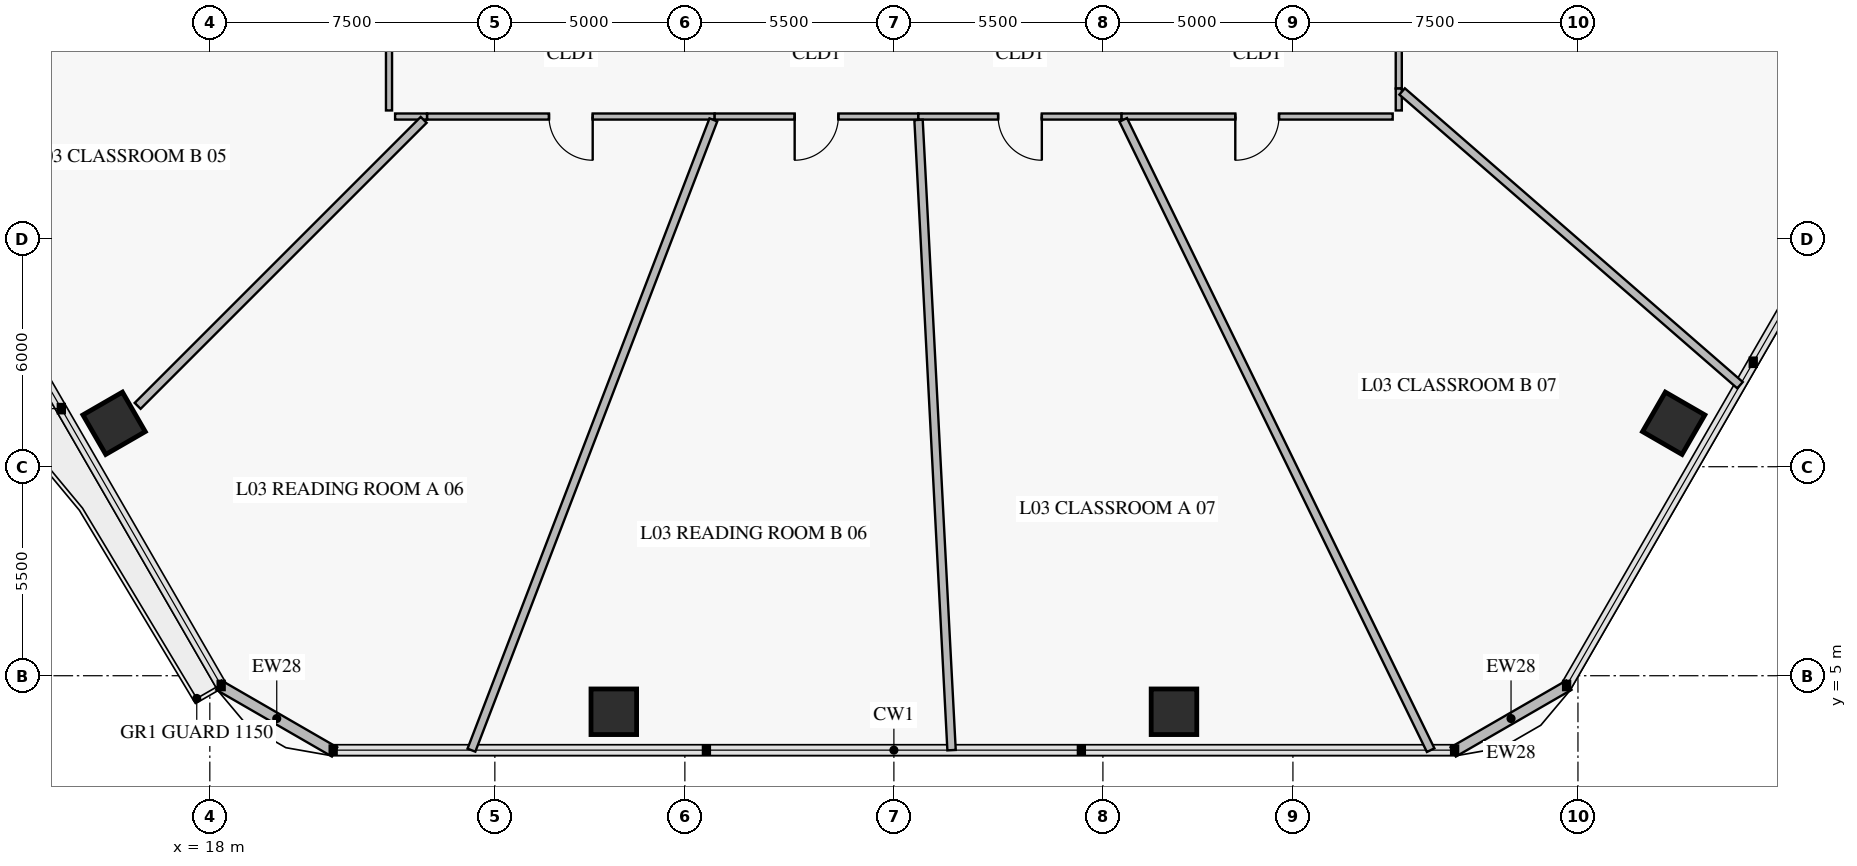
"""IFC4 building model, lengths in metres.
Left out: names, types, materials, properties, quantities, classifications, styles, units other than length and angle.
Written with IfcOpenShell. Run it as: python <this file> out.ifc"""

import sys

from ifc_helpers import new_model, si_unit, direction, frame, frame_2d, origin, origin_2d, place, context, subcontext, project, spatial, rectangle, extrude, element, fill, save


model = new_model("IFC4")
c1 = context("Model", 3, precision=1e-05, world=origin(), true_north=direction((0.0, 1.0)))
c2 = subcontext(c1, "Body", "Model", "MODEL_VIEW")
j1 = project(units=[si_unit("LENGTHUNIT", "METRE"), si_unit("PLANEANGLEUNIT", "RADIAN")], contexts=[c1])
p1 = place(None, origin())
s1 = spatial("IfcSite", under=j1, at=p1, CompositionType="ELEMENT")
p2 = place(p1, origin())
s2 = spatial("IfcBuilding", under=s1, at=p2, CompositionType="ELEMENT")
p3 = place(p2, frame((0.0, 0.0, 12.0)))
s3 = spatial("IfcBuildingStorey", under=s2, at=p3, CompositionType="ELEMENT", Elevation=12.0)
for number, where, z_axis, x_axis in (
    (1, (15.481, 11.643, 0.0), (0.0, 0.0, 1.0), (0.5, -0.866, 0.0)),
    (2, (28.63, 4.052, 0.0), (0.0, 0.0, 1.0), (1.0, 0.0, 0.0)),
    (3, (43.37, 4.052, 0.0), (0.0, 0.0, 1.0), (1.0, 0.0, 0.0)),
    (4, (56.519, 11.643, 0.0), (0.0, 0.0, 1.0), (0.5, 0.866, 0.0)),
):
    element("IfcColumn", number, at=place(p3, frame(where, z_axis=z_axis, x_axis=x_axis)), inside=s3, PredefinedType="COLUMN", context=c2, shape_type="SweptSolid", body=[
        extrude(rectangle(XDim=1.2, YDim=1.2, at=origin_2d()), origin(), (0.0, 0.0, 1.0), 3.92),
    ])
for number, where, z_axis, x_axis in (
    (5, (53.761, 4.751, 0.0), (0.0, 0.0, 1.0), (-0.866, -0.5, 0.0)),
    (6, (21.283, 2.994, 0.0), (0.0, 0.0, 1.0), (-0.866, 0.5, 0.0)),
):
    element("IfcWall", number, at=place(p3, frame(where, z_axis=z_axis, x_axis=x_axis)), inside=s3, PredefinedType="SOLIDWALL", context=c2, shape_type="SweptSolid", body=[
        extrude(rectangle(XDim=3.515, YDim=0.28, at=frame_2d((1.757, 0.0))), origin(), (0.0, 0.0, 1.0), 3.92),
    ])
p4 = place(p3, frame((22.715, 26.633, 0.0), z_axis=(0.0, 0.0, 1.0), x_axis=(0.0, -1.0, 0.0)))
e7 = element("IfcWall", 7, at=p4, inside=s3, PredefinedType="PARTITIONING", context=c2, shape_type="SweptSolid", body=[
    extrude(rectangle(XDim=6.758, YDim=0.16, at=frame_2d((3.379, 0.0))), origin(), (0.0, 0.0, 1.0), 3.92),
])
p5 = place(p4, frame((2.804, 0.0, 0.0)))
e8 = element("IfcOpeningElement", 8, at=p5, cuts=e7, PredefinedType="OPENING", context=c2, shape_type="SweptSolid", body=[
    extrude(rectangle(XDim=1.15, YDim=2.2, at=frame_2d((0.575, 1.1))), frame((0.0, 0.092, 0.0), z_axis=(0.0, -1.0, 0.0), x_axis=(1.0, 0.0, 0.0)), (0.0, 0.0, 1.0), 0.184),
])
p6 = place(p3, frame((23.715, 19.715, 0.0), z_axis=(0.0, 0.0, 1.0), x_axis=(1.0, 0.0, 0.0)))
e9 = element("IfcWall", 9, at=p6, inside=s3, PredefinedType="PARTITIONING", context=c2, shape_type="SweptSolid", body=[
    extrude(rectangle(XDim=7.569, YDim=0.16, at=frame_2d((3.785, 0.0))), origin(), (0.0, 0.0, 1.0), 3.22),
])
p7 = place(p6, frame((3.21, 0.0, 0.0)))
e10 = element("IfcOpeningElement", 10, at=p7, cuts=e9, PredefinedType="OPENING", context=c2, shape_type="SweptSolid", body=[
    extrude(rectangle(XDim=1.15, YDim=2.2, at=frame_2d((0.575, 1.1))), frame((0.0, 0.092, 0.0), z_axis=(0.0, -1.0, 0.0), x_axis=(1.0, 0.0, 0.0)), (0.0, 0.0, 1.0), 0.184),
])
p8 = place(p3, frame((31.284, 19.715, 0.0), z_axis=(0.0, 0.0, 1.0), x_axis=(1.0, 0.0, 0.0)))
e11 = element("IfcWall", 11, at=p8, inside=s3, PredefinedType="PARTITIONING", context=c2, shape_type="SweptSolid", body=[
    extrude(rectangle(XDim=5.36, YDim=0.16, at=frame_2d((2.68, 0.0))), origin(), (0.0, 0.0, 1.0), 3.22),
])
p9 = place(p8, frame((2.105, 0.0, 0.0)))
e12 = element("IfcOpeningElement", 12, at=p9, cuts=e11, PredefinedType="OPENING", context=c2, shape_type="SweptSolid", body=[
    extrude(rectangle(XDim=1.15, YDim=2.2, at=frame_2d((0.575, 1.1))), frame((0.0, 0.092, 0.0), z_axis=(0.0, -1.0, 0.0), x_axis=(1.0, 0.0, 0.0)), (0.0, 0.0, 1.0), 0.184),
])
p10 = place(p3, frame((36.644, 19.715, 0.0), z_axis=(0.0, 0.0, 1.0), x_axis=(1.0, 0.0, 0.0)))
e13 = element("IfcWall", 13, at=p10, inside=s3, PredefinedType="PARTITIONING", context=c2, shape_type="SweptSolid", body=[
    extrude(rectangle(XDim=5.348, YDim=0.16, at=frame_2d((2.674, 0.0))), origin(), (0.0, 0.0, 1.0), 3.22),
])
p11 = place(p10, frame((2.099, 0.0, 0.0)))
e14 = element("IfcOpeningElement", 14, at=p11, cuts=e13, PredefinedType="OPENING", context=c2, shape_type="SweptSolid", body=[
    extrude(rectangle(XDim=1.15, YDim=2.2, at=frame_2d((0.575, 1.1))), frame((0.0, 0.092, 0.0), z_axis=(0.0, -1.0, 0.0), x_axis=(1.0, 0.0, 0.0)), (0.0, 0.0, 1.0), 0.184),
])
p12 = place(p3, frame((41.992, 19.715, 0.0), z_axis=(0.0, 0.0, 1.0), x_axis=(1.0, 0.0, 0.0)))
e15 = element("IfcWall", 15, at=p12, inside=s3, PredefinedType="PARTITIONING", context=c2, shape_type="SweptSolid", body=[
    extrude(rectangle(XDim=7.133, YDim=0.16, at=frame_2d((3.567, 0.0))), origin(), (0.0, 0.0, 1.0), 3.22),
])
p13 = place(p12, frame((2.992, 0.0, 0.0)))
e16 = element("IfcOpeningElement", 16, at=p13, cuts=e15, PredefinedType="OPENING", context=c2, shape_type="SweptSolid", body=[
    extrude(rectangle(XDim=1.15, YDim=2.2, at=frame_2d((0.575, 1.1))), frame((0.0, 0.092, 0.0), z_axis=(0.0, -1.0, 0.0), x_axis=(1.0, 0.0, 0.0)), (0.0, 0.0, 1.0), 0.184),
])
p14 = place(p3, frame((49.285, 20.451, 0.0), z_axis=(0.0, 0.0, 1.0), x_axis=(0.0, 1.0, 0.0)))
e17 = element("IfcWall", 17, at=p14, inside=s3, PredefinedType="PARTITIONING", context=c2, shape_type="SweptSolid", body=[
    extrude(rectangle(XDim=12.711, YDim=0.16, at=frame_2d((6.355, 0.0))), origin(), (0.0, 0.0, 1.0), 3.22),
])
p15 = place(p14, frame((5.88, 0.0, 0.0)))
e18 = element("IfcOpeningElement", 18, at=p15, cuts=e17, PredefinedType="OPENING", context=c2, shape_type="SweptSolid", body=[
    extrude(rectangle(XDim=0.95, YDim=2.1, at=frame_2d((0.475, 1.05))), frame((0.0, 0.092, 0.0), z_axis=(0.0, -1.0, 0.0), x_axis=(1.0, 0.0, 0.0)), (0.0, 0.0, 1.0), 0.184),
])
p16 = place(p3, frame((22.627, 26.597, 0.0), z_axis=(0.0, 0.0, 1.0), x_axis=(-0.927186166431, -0.3746008713, 0.0)))
e19 = element("IfcWall", 19, at=p16, inside=s3, PredefinedType="PARTITIONING", context=c2, shape_type="SweptSolid", body=[
    extrude(rectangle(XDim=14.82, YDim=0.22, at=frame_2d((7.41, 0.0))), origin(), (0.0, 0.0, 1.0), 3.17),
])
p17 = place(p3, frame((22.875, 19.715, 0.0), z_axis=(0.0, 0.0, 1.0), x_axis=(1.0, 0.0, 0.0)))
e20 = element("IfcWall", 20, at=p17, inside=s3, PredefinedType="PARTITIONING", context=c2, shape_type="SweptSolid", body=[
    extrude(rectangle(XDim=0.84, YDim=0.16, at=frame_2d((0.42, 0.0))), origin(), (0.0, 0.0, 1.0), 3.22),
])
p18 = place(p3, frame((23.627, 19.627, 0.0), z_axis=(0.0, 0.0, 1.0), x_axis=(-0.707106781187, -0.707106781187, 0.0)))
e21 = element("IfcWall", 21, at=p18, inside=s3, PredefinedType="PARTITIONING", context=c2, shape_type="SweptSolid", body=[
    extrude(rectangle(XDim=10.643, YDim=0.22, at=frame_2d((5.322, 0.0))), origin(), (0.0, 0.0, 1.0), 3.22),
])
p19 = place(p3, frame((31.25, 19.627, 0.0), z_axis=(0.0, 0.0, 1.0), x_axis=(-0.358374904207, -0.933577756823, 0.0)))
e22 = element("IfcWall", 22, at=p19, inside=s3, PredefinedType="PARTITIONING", context=c2, shape_type="SweptSolid", body=[
    extrude(rectangle(XDim=17.765, YDim=0.22, at=frame_2d((8.883, 0.0))), origin(), (0.0, 0.0, 1.0), 3.17),
])
p20 = place(p3, frame((36.648, 19.627, 0.0), z_axis=(0.0, 0.0, 1.0), x_axis=(0.052331996973, -0.998629742243, 0.0)))
e23 = element("IfcWall", 23, at=p20, inside=s3, PredefinedType="PARTITIONING", context=c2, shape_type="SweptSolid", body=[
    extrude(rectangle(XDim=16.608, YDim=0.22, at=frame_2d((8.304, 0.0))), origin(), (0.0, 0.0, 1.0), 3.17),
])
p21 = place(p3, frame((42.035, 19.627, 0.0), z_axis=(0.0, 0.0, 1.0), x_axis=(0.438375147569, -0.898792094977, 0.0)))
e24 = element("IfcWall", 24, at=p21, inside=s3, PredefinedType="PARTITIONING", context=c2, shape_type="SweptSolid", body=[
    extrude(rectangle(XDim=18.453, YDim=0.22, at=frame_2d((9.227, 0.0))), origin(), (0.0, 0.0, 1.0), 3.17),
])
p22 = place(p3, frame((49.285, 19.875, 0.0), z_axis=(0.0, 0.0, 1.0), x_axis=(0.0, 1.0, 0.0)))
e25 = element("IfcWall", 25, at=p22, inside=s3, PredefinedType="PARTITIONING", context=c2, shape_type="SweptSolid", body=[
    extrude(rectangle(XDim=0.576, YDim=0.16, at=frame_2d((0.288, 0.0))), origin(), (0.0, 0.0, 1.0), 3.92),
])
p23 = place(p3, frame((49.373, 20.375, 0.0), z_axis=(0.0, 0.0, 1.0), x_axis=(0.754715261602, -0.656052493254, 0.0)))
e26 = element("IfcWall", 26, at=p23, inside=s3, PredefinedType="PARTITIONING", context=c2, shape_type="SweptSolid", body=[
    extrude(rectangle(XDim=11.781, YDim=0.22, at=frame_2d((5.891, 0.0))), origin(), (0.0, 0.0, 1.0), 3.17),
])
p24 = place(p7, frame((1.15, 0.0, 0.0), z_axis=(0.0, 0.0, 1.0), x_axis=(-1.0, 0.0, 0.0)))
e27 = element("IfcDoor", 27, at=p24, inside=s3, OperationType="SINGLE_SWING_LEFT", PredefinedType="DOOR", context=c2, shape_type="SweptSolid", body=[
    extrude(rectangle(XDim=1.15, YDim=2.2, at=frame_2d((0.575, 1.1))), frame((0.0, 0.025, 0.0), z_axis=(0.0, -1.0, 0.0), x_axis=(1.0, 0.0, 0.0)), (0.0, 0.0, 1.0), 0.05),
])
fill(e10, e27)
p25 = place(p9, frame((1.15, 0.0, 0.0), z_axis=(0.0, 0.0, 1.0), x_axis=(-1.0, 0.0, 0.0)))
e28 = element("IfcDoor", 28, at=p25, inside=s3, OperationType="SINGLE_SWING_RIGHT", PredefinedType="DOOR", context=c2, shape_type="SweptSolid", body=[
    extrude(rectangle(XDim=1.15, YDim=2.2, at=frame_2d((0.575, 1.1))), frame((0.0, 0.025, 0.0), z_axis=(0.0, -1.0, 0.0), x_axis=(1.0, 0.0, 0.0)), (0.0, 0.0, 1.0), 0.05),
])
fill(e12, e28)
p26 = place(p11, frame((1.15, 0.0, 0.0), z_axis=(0.0, 0.0, 1.0), x_axis=(-1.0, 0.0, 0.0)))
e29 = element("IfcDoor", 29, at=p26, inside=s3, OperationType="SINGLE_SWING_LEFT", PredefinedType="DOOR", context=c2, shape_type="SweptSolid", body=[
    extrude(rectangle(XDim=1.15, YDim=2.2, at=frame_2d((0.575, 1.1))), frame((0.0, 0.025, 0.0), z_axis=(0.0, -1.0, 0.0), x_axis=(1.0, 0.0, 0.0)), (0.0, 0.0, 1.0), 0.05),
])
fill(e14, e29)
p27 = place(p13, frame((1.15, 0.0, 0.0), z_axis=(0.0, 0.0, 1.0), x_axis=(-1.0, 0.0, 0.0)))
e30 = element("IfcDoor", 30, at=p27, inside=s3, OperationType="SINGLE_SWING_RIGHT", PredefinedType="DOOR", context=c2, shape_type="SweptSolid", body=[
    extrude(rectangle(XDim=1.15, YDim=2.2, at=frame_2d((0.575, 1.1))), frame((0.0, 0.025, 0.0), z_axis=(0.0, -1.0, 0.0), x_axis=(1.0, 0.0, 0.0)), (0.0, 0.0, 1.0), 0.05),
])
fill(e16, e30)
save(model, sys.argv[1])
